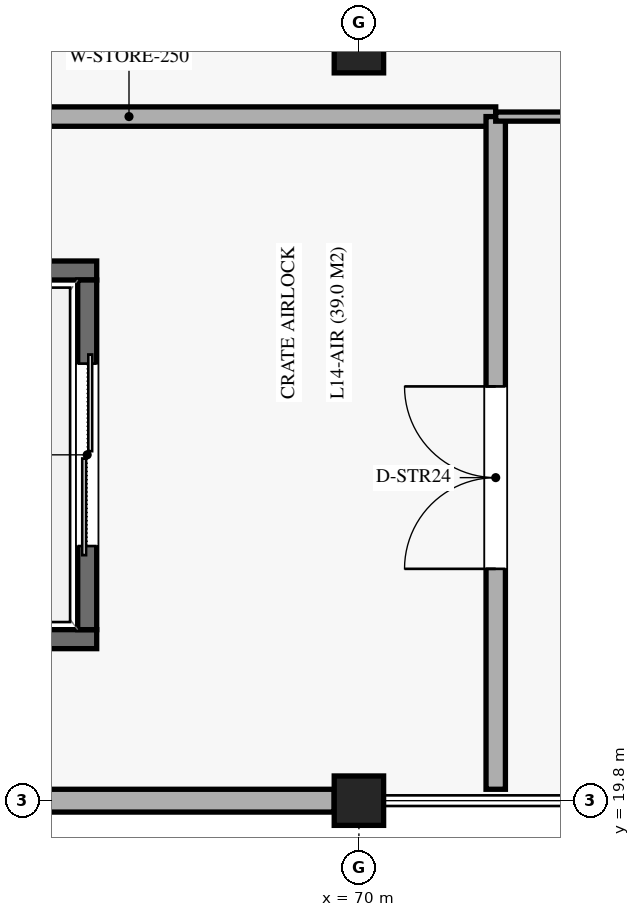
"""IFC4 building model, lengths in metres.
Left out: names, types, materials, properties, quantities, classifications, styles, units other than length and angle.
Written with IfcOpenShell. Run it as: python <this file> out.ifc"""

import sys

from ifc_helpers import new_model, si_unit, direction, frame, frame_2d, origin, origin_2d, place, context, subcontext, project, spatial, rectangle, extrude, element, fill, save


model = new_model("IFC4")
c1 = context("Model", 3, precision=1e-05, world=origin(), true_north=direction((0.0, 1.0)))
c2 = subcontext(c1, "Body", "Model", "MODEL_VIEW")
j1 = project(units=[si_unit("LENGTHUNIT", "METRE"), si_unit("PLANEANGLEUNIT", "RADIAN")], contexts=[c1])
p1 = place(None, origin())
s1 = spatial("IfcSite", under=j1, at=p1, CompositionType="ELEMENT")
p2 = place(p1, origin())
s2 = spatial("IfcBuilding", under=s1, at=p2, CompositionType="ELEMENT")
p3 = place(p2, frame((0.0, 0.0, 70.38)))
s3 = spatial("IfcBuildingStorey", under=s2, at=p3, CompositionType="ELEMENT", Elevation=70.38)
for number, where, z_axis, x_axis in (
    (1, (70.0, 19.8, 0.0), (0.0, 0.0, 1.0), (1.0, 0.0, 0.0)),
    (2, (70.0, 29.7, 0.0), (0.0, 0.0, 1.0), (1.0, 0.0, 0.0)),
):
    element("IfcColumn", number, at=place(p3, frame(where, z_axis=z_axis, x_axis=x_axis)), inside=s3, PredefinedType="COLUMN", context=c2, shape_type="SweptSolid", body=[
        extrude(rectangle(XDim=0.65, YDim=0.65, at=origin_2d()), origin(), (0.0, 0.0, 1.0), 4.08),
    ])
p4 = place(p3, frame((62.325, 19.8, 0.0), z_axis=(0.0, 0.0, 1.0), x_axis=(1.0, 0.0, 0.0)))
e3 = element("IfcWall", 3, at=p4, inside=s3, PredefinedType="SOLIDWALL", context=c2, shape_type="SweptSolid", body=[
    extrude(rectangle(XDim=7.35, YDim=0.3, at=frame_2d((3.675, 0.0))), origin(), (0.0, 0.0, 1.0), 3.08),
])
for number, where, z_axis, x_axis in (
    (4, (62.65, 21.925, 0.0), (0.0, 0.0, 1.0), (1.0, 0.0, 0.0)),
    (5, (62.65, 26.775, 0.0), (0.0, 0.0, 1.0), (1.0, 0.0, 0.0)),
):
    element("IfcWall", number, at=place(p3, frame(where, z_axis=z_axis, x_axis=x_axis)), inside=s3, PredefinedType="SOLIDWALL", context=c2, shape_type="SweptSolid", body=[
        extrude(rectangle(XDim=3.9, YDim=0.25, at=frame_2d((1.95, 0.0))), origin(), (0.0, 0.0, 1.0), 3.81),
    ])
p5 = place(p3, frame((66.425, 22.05, 0.0), z_axis=(0.0, 0.0, 1.0), x_axis=(0.0, 1.0, 0.0)))
e6 = element("IfcWall", 6, at=p5, inside=s3, PredefinedType="SOLIDWALL", context=c2, shape_type="SweptSolid", body=[
    extrude(rectangle(XDim=4.6, YDim=0.25, at=frame_2d((2.3, 0.0))), origin(), (0.0, 0.0, 1.0), 3.81),
])
p6 = place(p5, frame((1.1, 0.0, 0.0)))
e7 = element("IfcOpeningElement", 7, at=p6, cuts=e6, PredefinedType="OPENING", context=c2, shape_type="SweptSolid", body=[
    extrude(rectangle(XDim=2.4, YDim=2.65, at=frame_2d((1.2, 1.325))), frame((0.0, 0.135, 0.0), z_axis=(0.0, -1.0, 0.0), x_axis=(1.0, 0.0, 0.0)), (0.0, 0.0, 1.0), 0.27),
])
p7 = place(p3, frame((62.15, 28.8, 0.0), z_axis=(0.0, 0.0, 1.0), x_axis=(1.0, 0.0, 0.0)))
e8 = element("IfcWall", 8, at=p7, inside=s3, PredefinedType="SOLIDWALL", context=c2, shape_type="SweptSolid", body=[
    extrude(rectangle(XDim=9.65, YDim=0.255, at=frame_2d((4.825, 0.0))), origin(), (0.0, 0.0, 1.0), 2.95),
])
p8 = place(p3, frame((71.8, 19.95, 0.0), z_axis=(0.0, 0.0, 1.0), x_axis=(0.0, 1.0, 0.0)))
e9 = element("IfcWall", 9, at=p8, inside=s3, PredefinedType="SOLIDWALL", context=c2, shape_type="SweptSolid", body=[
    extrude(rectangle(XDim=8.85, YDim=0.255, at=frame_2d((4.425, 0.0))), origin(), (0.0, 0.0, 1.0), 2.95),
])
p9 = place(p8, frame((2.9, 0.0, 0.0)))
e10 = element("IfcOpeningElement", 10, at=p9, cuts=e9, PredefinedType="OPENING", context=c2, shape_type="SweptSolid", body=[
    extrude(rectangle(XDim=2.4, YDim=2.5, at=frame_2d((1.2, 1.25))), frame((0.0, 0.137, 0.0), z_axis=(0.0, -1.0, 0.0), x_axis=(1.0, 0.0, 0.0)), (0.0, 0.0, 1.0), 0.275),
])
p10 = place(p3, frame((71.8, 28.8, 0.0), z_axis=(0.0, 0.0, 1.0), x_axis=(1.0, 0.0, 0.0)))
e11 = element("IfcWall", 11, at=p10, inside=s3, PredefinedType="PARTITIONING", context=c2, shape_type="SweptSolid", body=[
    extrude(rectangle(XDim=2.2, YDim=0.12, at=frame_2d((1.1, 0.0))), origin(), (0.0, 0.0, 1.0), 2.95),
])
p11 = place(p6, origin())
e12 = element("IfcDoor", 12, at=p11, inside=s3, OperationType="DOUBLE_DOOR_SLIDING", PredefinedType="DOOR", context=c2, shape_type="SweptSolid", body=[
    extrude(rectangle(XDim=2.4, YDim=2.65, at=frame_2d((1.2, 1.325))), frame((0.0, 0.025, 0.0), z_axis=(0.0, -1.0, 0.0), x_axis=(1.0, 0.0, 0.0)), (0.0, 0.0, 1.0), 0.05),
])
fill(e7, e12)
p12 = place(p9, origin())
e13 = element("IfcDoor", 13, at=p12, inside=s3, OperationType="DOUBLE_DOOR_SINGLE_SWING", PredefinedType="DOOR", context=c2, shape_type="SweptSolid", body=[
    extrude(rectangle(XDim=2.4, YDim=2.5, at=frame_2d((1.2, 1.25))), frame((0.0, 0.025, 0.0), z_axis=(0.0, -1.0, 0.0), x_axis=(1.0, 0.0, 0.0)), (0.0, 0.0, 1.0), 0.05),
])
fill(e10, e13)
save(model, sys.argv[1])
